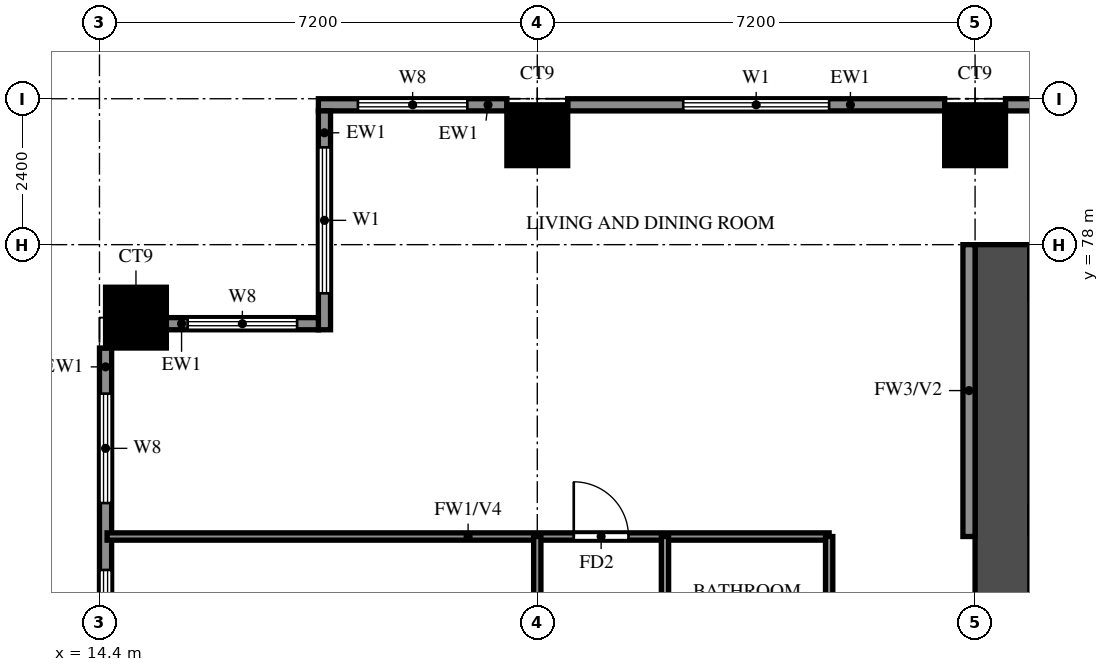
"""IFC4 building model, lengths in metres.
Left out: names, types, materials, properties, quantities, classifications, styles, units other than length and angle.
Written with IfcOpenShell. Run it as: python <this file> out.ifc"""

import sys

from ifc_helpers import new_model, si_unit, direction, frame, frame_2d, origin, origin_2d, place, context, subcontext, project, spatial, rectangle, extrude, source, transform, mapped, element, fill, save


model = new_model("IFC4")
c1 = context("Model", 3, precision=1e-05, world=origin(), true_north=direction((0.0, 1.0)))
c2 = subcontext(c1, "Body", "Model", "MODEL_VIEW")
j1 = project(units=[si_unit("LENGTHUNIT", "METRE"), si_unit("PLANEANGLEUNIT", "RADIAN")], contexts=[c1])
p1 = place(None, origin())
s1 = spatial("IfcSite", under=j1, at=p1, CompositionType="ELEMENT")
p2 = place(p1, origin())
s2 = spatial("IfcBuilding", under=s1, at=p2, CompositionType="ELEMENT")
p3 = place(p2, frame((0.0, 0.0, 72.5)))
s3 = spatial("IfcBuildingStorey", under=s2, at=p3, CompositionType="ELEMENT", Elevation=72.5)
m1 = source(origin(), c2, "Body", "SweptSolid", [
    extrude(rectangle(XDim=1.0, YDim=1.0, at=origin_2d()), origin(), (0.0, 0.0, 1.0), 3.18),
])
for number, where, z_axis, x_axis in (
    (1, (15.0, 76.8, 0.0), (0.0, 0.0, 1.0), (1.0, 0.0, 0.0)),
    (2, (21.6, 79.8, 0.0), (0.0, 0.0, 1.0), (1.0, 0.0, 0.0)),
    (3, (28.8, 79.8, 0.0), (0.0, 0.0, 1.0), (1.0, 0.0, 0.0)),
):
    element("IfcColumn", number, at=place(p3, frame(where, z_axis=z_axis, x_axis=x_axis)), inside=s3, PredefinedType="COLUMN", context=c2, shape_type="MappedRepresentation", body=[
        mapped(m1, transform((0.0, 0.0, 0.0))),
    ])
p4 = place(p3, frame((29.25, 66.0, 0.0), z_axis=(0.0, 0.0, 1.0), x_axis=(0.0, 1.0, 0.0)))
e4 = element("IfcWall", 4, at=p4, inside=s3, PredefinedType="SHEAR", context=c2, shape_type="SweptSolid", body=[
    extrude(rectangle(XDim=12.0, YDim=0.9, at=frame_2d((6.0, 0.0))), origin(), (0.0, 0.0, 1.0), 3.18),
])
p5 = place(p3, frame((29.7, 73.475, 0.0), z_axis=(0.0, 0.0, 1.0), x_axis=(1.0, 0.0, 0.0)))
e5 = element("IfcWall", 5, at=p5, inside=s3, PredefinedType="SHEAR", context=c2, shape_type="SweptSolid", body=[
    extrude(rectangle(XDim=3.175, YDim=0.45, at=frame_2d((1.587, 0.0))), origin(), (0.0, 0.0, 1.0), 3.18),
])
p6 = place(p3, frame((35.5, 80.3, 0.0), z_axis=(0.0, 0.0, 1.0), x_axis=(-1.0, 0.0, 0.0)))
e6 = element("IfcWall", 6, at=p6, inside=s3, PredefinedType="SOLIDWALL", context=c2, shape_type="SweptSolid", body=[
    extrude(rectangle(XDim=6.2, YDim=0.2, at=frame_2d((3.1, 0.0))), origin(), (0.0, 0.0, 1.0), 3.18),
])
p7 = place(p3, frame((28.3, 80.3, 0.0), z_axis=(0.0, 0.0, 1.0), x_axis=(-1.0, 0.0, 0.0)))
e7 = element("IfcWall", 7, at=p7, inside=s3, PredefinedType="SOLIDWALL", context=c2, shape_type="SweptSolid", body=[
    extrude(rectangle(XDim=6.2, YDim=0.2, at=frame_2d((3.1, 0.0))), origin(), (0.0, 0.0, 1.0), 3.18),
])
p8 = place(p7, frame((1.9, 0.0, 0.6)))
e8 = element("IfcOpeningElement", 8, at=p8, cuts=e7, PredefinedType="OPENING", context=c2, shape_type="SweptSolid", body=[
    extrude(rectangle(XDim=2.4, YDim=2.4, at=frame_2d((1.2, 1.2))), frame((0.0, 0.11, 0.0), z_axis=(0.0, -1.0, 0.0), x_axis=(1.0, 0.0, 0.0)), (0.0, 0.0, 1.0), 0.22),
])
p9 = place(p3, frame((21.1, 80.3, 0.0), z_axis=(0.0, 0.0, 1.0), x_axis=(-1.0, 0.0, 0.0)))
e9 = element("IfcWall", 9, at=p9, inside=s3, PredefinedType="SOLIDWALL", context=c2, shape_type="SweptSolid", body=[
    extrude(rectangle(XDim=3.1, YDim=0.2, at=frame_2d((1.55, 0.0))), origin(), (0.0, 0.0, 1.0), 3.18),
])
p10 = place(p9, frame((0.65, 0.0, 0.6)))
e10 = element("IfcOpeningElement", 10, at=p10, cuts=e9, PredefinedType="OPENING", context=c2, shape_type="SweptSolid", body=[
    extrude(rectangle(XDim=1.8, YDim=2.4, at=frame_2d((0.9, 1.2))), frame((0.0, 0.11, 0.0), z_axis=(0.0, -1.0, 0.0), x_axis=(1.0, 0.0, 0.0)), (0.0, 0.0, 1.0), 0.22),
])
p11 = place(p3, frame((18.1, 80.2, 0.0), z_axis=(0.0, 0.0, 1.0), x_axis=(0.0, -1.0, 0.0)))
e11 = element("IfcWall", 11, at=p11, inside=s3, PredefinedType="SOLIDWALL", context=c2, shape_type="SweptSolid", body=[
    extrude(rectangle(XDim=3.6, YDim=0.2, at=frame_2d((1.8, 0.0))), origin(), (0.0, 0.0, 1.0), 3.18),
])
p12 = place(p11, frame((0.6, 0.0, 0.6)))
e12 = element("IfcOpeningElement", 12, at=p12, cuts=e11, PredefinedType="OPENING", context=c2, shape_type="SweptSolid", body=[
    extrude(rectangle(XDim=2.4, YDim=2.4, at=frame_2d((1.2, 1.2))), frame((0.0, 0.11, 0.0), z_axis=(0.0, -1.0, 0.0), x_axis=(1.0, 0.0, 0.0)), (0.0, 0.0, 1.0), 0.22),
])
p13 = place(p3, frame((18.0, 76.7, 0.0), z_axis=(0.0, 0.0, 1.0), x_axis=(-1.0, 0.0, 0.0)))
e13 = element("IfcWall", 13, at=p13, inside=s3, PredefinedType="SOLIDWALL", context=c2, shape_type="SweptSolid", body=[
    extrude(rectangle(XDim=2.5, YDim=0.2, at=frame_2d((1.25, 0.0))), origin(), (0.0, 0.0, 1.0), 3.18),
])
p14 = place(p13, frame((0.35, 0.0, 0.6)))
e14 = element("IfcOpeningElement", 14, at=p14, cuts=e13, PredefinedType="OPENING", context=c2, shape_type="SweptSolid", body=[
    extrude(rectangle(XDim=1.8, YDim=2.4, at=frame_2d((0.9, 1.2))), frame((0.0, 0.11, 0.0), z_axis=(0.0, -1.0, 0.0), x_axis=(1.0, 0.0, 0.0)), (0.0, 0.0, 1.0), 0.22),
])
p15 = place(p3, frame((14.5, 76.3, 0.0), z_axis=(0.0, 0.0, 1.0), x_axis=(0.0, -1.0, 0.0)))
e15 = element("IfcWall", 15, at=p15, inside=s3, PredefinedType="SOLIDWALL", context=c2, shape_type="SweptSolid", body=[
    extrude(rectangle(XDim=6.2, YDim=0.2, at=frame_2d((3.1, 0.0))), origin(), (0.0, 0.0, 1.0), 3.18),
])
p16 = place(p15, frame((3.65, 0.0, 0.6)))
e16 = element("IfcOpeningElement", 16, at=p16, cuts=e15, PredefinedType="OPENING", context=c2, shape_type="SweptSolid", body=[
    extrude(rectangle(XDim=1.8, YDim=2.4, at=frame_2d((0.9, 1.2))), frame((0.0, 0.11, 0.0), z_axis=(0.0, -1.0, 0.0), x_axis=(1.0, 0.0, 0.0)), (0.0, 0.0, 1.0), 0.22),
])
p17 = place(p15, frame((0.75, 0.0, 0.6)))
e17 = element("IfcOpeningElement", 17, at=p17, cuts=e15, PredefinedType="OPENING", context=c2, shape_type="SweptSolid", body=[
    extrude(rectangle(XDim=1.8, YDim=2.4, at=frame_2d((0.9, 1.2))), frame((0.0, 0.11, 0.0), z_axis=(0.0, -1.0, 0.0), x_axis=(1.0, 0.0, 0.0)), (0.0, 0.0, 1.0), 0.22),
])
p18 = place(p3, frame((28.7, 73.2, 0.0), z_axis=(0.0, 0.0, 1.0), x_axis=(0.0, 1.0, 0.0)))
e18 = element("IfcWall", 18, at=p18, inside=s3, PredefinedType="SOLIDWALL", context=c2, shape_type="SweptSolid", body=[
    extrude(rectangle(XDim=4.8, YDim=0.2, at=frame_2d((2.4, 0.0))), origin(), (0.0, 0.0, 1.0), 3.18),
])
p19 = place(p3, frame((14.525, 73.2, 0.0), z_axis=(0.0, 0.0, 1.0), x_axis=(1.0, 0.0, 0.0)))
e19 = element("IfcWall", 19, at=p19, inside=s3, PredefinedType="PARTITIONING", context=c2, shape_type="SweptSolid", body=[
    extrude(rectangle(XDim=11.875, YDim=0.12, at=frame_2d((5.938, 0.0))), origin(), (0.0, 0.0, 1.0), 2.28),
])
p20 = place(p19, frame((7.675, 0.0, 0.0)))
e20 = element("IfcOpeningElement", 20, at=p20, cuts=e19, PredefinedType="OPENING", context=c2, shape_type="SweptSolid", body=[
    extrude(rectangle(XDim=0.9, YDim=2.1, at=frame_2d((0.45, 1.05))), frame((0.0, 0.07, 0.0), z_axis=(0.0, -1.0, 0.0), x_axis=(1.0, 0.0, 0.0)), (0.0, 0.0, 1.0), 0.14),
])
p21 = place(p3, frame((21.6, 33.725, 0.0), z_axis=(0.0, 0.0, 1.0), x_axis=(0.0, 1.0, 0.0)))
e21 = element("IfcWall", 21, at=p21, inside=s3, PredefinedType="PARTITIONING", context=c2, shape_type="SweptSolid", body=[
    extrude(rectangle(XDim=39.475, YDim=0.12, at=frame_2d((19.737, 0.0))), origin(), (0.0, 0.0, 1.0), 3.18),
])
p22 = place(p21, frame((7.775, 0.0, 0.0)))
e22 = element("IfcOpeningElement", 22, at=p22, cuts=e21, PredefinedType="OPENING", context=c2, shape_type="SweptSolid", body=[
    extrude(rectangle(XDim=0.9, YDim=2.1, at=frame_2d((0.45, 1.05))), frame((0.0, 0.07, 0.0), z_axis=(0.0, -1.0, 0.0), x_axis=(1.0, 0.0, 0.0)), (0.0, 0.0, 1.0), 0.14),
])
p23 = place(p21, frame((17.125, 0.0, 0.0)))
e23 = element("IfcOpeningElement", 23, at=p23, cuts=e21, PredefinedType="OPENING", context=c2, shape_type="SweptSolid", body=[
    extrude(rectangle(XDim=1.5, YDim=2.1, at=frame_2d((0.75, 1.05))), frame((0.0, 0.07, 0.0), z_axis=(0.0, -1.0, 0.0), x_axis=(1.0, 0.0, 0.0)), (0.0, 0.0, 1.0), 0.14),
])
p24 = place(p21, frame((22.825, 0.0, 0.0)))
e24 = element("IfcOpeningElement", 24, at=p24, cuts=e21, PredefinedType="OPENING", context=c2, shape_type="SweptSolid", body=[
    extrude(rectangle(XDim=0.9, YDim=2.1, at=frame_2d((0.45, 1.05))), frame((0.0, 0.07, 0.0), z_axis=(0.0, -1.0, 0.0), x_axis=(1.0, 0.0, 0.0)), (0.0, 0.0, 1.0), 0.14),
])
p25 = place(p21, frame((26.425, 0.0, 0.0)))
e25 = element("IfcOpeningElement", 25, at=p25, cuts=e21, PredefinedType="OPENING", context=c2, shape_type="SweptSolid", body=[
    extrude(rectangle(XDim=0.9, YDim=2.1, at=frame_2d((0.45, 1.05))), frame((0.0, 0.07, 0.0), z_axis=(0.0, -1.0, 0.0), x_axis=(1.0, 0.0, 0.0)), (0.0, 0.0, 1.0), 0.14),
])
p26 = place(p21, frame((30.025, 0.0, 0.0)))
e26 = element("IfcOpeningElement", 26, at=p26, cuts=e21, PredefinedType="OPENING", context=c2, shape_type="SweptSolid", body=[
    extrude(rectangle(XDim=0.9, YDim=2.1, at=frame_2d((0.45, 1.05))), frame((0.0, 0.07, 0.0), z_axis=(0.0, -1.0, 0.0), x_axis=(1.0, 0.0, 0.0)), (0.0, 0.0, 1.0), 0.14),
])
p27 = place(p21, frame((33.625, 0.0, 0.0)))
e27 = element("IfcOpeningElement", 27, at=p27, cuts=e21, PredefinedType="OPENING", context=c2, shape_type="SweptSolid", body=[
    extrude(rectangle(XDim=0.9, YDim=2.1, at=frame_2d((0.45, 1.05))), frame((0.0, 0.07, 0.0), z_axis=(0.0, -1.0, 0.0), x_axis=(1.0, 0.0, 0.0)), (0.0, 0.0, 1.0), 0.14),
])
p28 = place(p21, frame((37.225, 0.0, 0.0)))
e28 = element("IfcOpeningElement", 28, at=p28, cuts=e21, PredefinedType="OPENING", context=c2, shape_type="SweptSolid", body=[
    extrude(rectangle(XDim=0.9, YDim=2.1, at=frame_2d((0.45, 1.05))), frame((0.0, 0.07, 0.0), z_axis=(0.0, -1.0, 0.0), x_axis=(1.0, 0.0, 0.0)), (0.0, 0.0, 1.0), 0.14),
])
p29 = place(p3, frame((23.7, 64.8, 0.0), z_axis=(0.0, 0.0, 1.0), x_axis=(0.0, 1.0, 0.0)))
e29 = element("IfcWall", 29, at=p29, inside=s3, PredefinedType="PARTITIONING", context=c2, shape_type="SweptSolid", body=[
    extrude(rectangle(XDim=8.4, YDim=0.12, at=frame_2d((4.2, 0.0))), origin(), (0.0, 0.0, 1.0), 3.18),
])
p30 = place(p29, frame((1.875, 0.0, 0.0)))
e30 = element("IfcOpeningElement", 30, at=p30, cuts=e29, PredefinedType="OPENING", context=c2, shape_type="SweptSolid", body=[
    extrude(rectangle(XDim=0.9, YDim=2.1, at=frame_2d((0.45, 1.05))), frame((0.0, 0.07, 0.0), z_axis=(0.0, -1.0, 0.0), x_axis=(1.0, 0.0, 0.0)), (0.0, 0.0, 1.0), 0.14),
])
p31 = place(p29, frame((6.125, 0.0, 0.0)))
e31 = element("IfcOpeningElement", 31, at=p31, cuts=e29, PredefinedType="OPENING", context=c2, shape_type="SweptSolid", body=[
    extrude(rectangle(XDim=0.8, YDim=2.1, at=frame_2d((0.4, 1.05))), frame((0.0, 0.07, 0.0), z_axis=(0.0, -1.0, 0.0), x_axis=(1.0, 0.0, 0.0)), (0.0, 0.0, 1.0), 0.14),
])
p32 = place(p3, frame((26.4, 69.62, 0.0), z_axis=(0.0, 0.0, 1.0), x_axis=(0.0, 1.0, 0.0)))
e32 = element("IfcWall", 32, at=p32, inside=s3, PredefinedType="PARTITIONING", context=c2, shape_type="SweptSolid", body=[
    extrude(rectangle(XDim=3.58, YDim=0.12, at=frame_2d((1.79, 0.0))), origin(), (0.0, 0.0, 1.0), 3.18),
])
p33 = place(p8, origin())
e33 = element("IfcWindow", 33, at=p33, inside=s3, PartitioningType="DOUBLE_PANEL_VERTICAL", PredefinedType="WINDOW", context=c2, shape_type="SweptSolid", body=[
    extrude(rectangle(XDim=2.4, YDim=2.4, at=frame_2d((1.2, 1.2))), frame((0.0, 0.03, 0.0), z_axis=(0.0, -1.0, 0.0), x_axis=(1.0, 0.0, 0.0)), (0.0, 0.0, 1.0), 0.06),
])
fill(e8, e33)
p34 = place(p10, origin())
e34 = element("IfcWindow", 34, at=p34, inside=s3, PartitioningType="DOUBLE_PANEL_VERTICAL", PredefinedType="WINDOW", context=c2, shape_type="SweptSolid", body=[
    extrude(rectangle(XDim=1.8, YDim=2.4, at=frame_2d((0.9, 1.2))), frame((0.0, 0.03, 0.0), z_axis=(0.0, -1.0, 0.0), x_axis=(1.0, 0.0, 0.0)), (0.0, 0.0, 1.0), 0.06),
])
fill(e10, e34)
p35 = place(p12, origin())
e35 = element("IfcWindow", 35, at=p35, inside=s3, PartitioningType="DOUBLE_PANEL_VERTICAL", PredefinedType="WINDOW", context=c2, shape_type="SweptSolid", body=[
    extrude(rectangle(XDim=2.4, YDim=2.4, at=frame_2d((1.2, 1.2))), frame((0.0, 0.03, 0.0), z_axis=(0.0, -1.0, 0.0), x_axis=(1.0, 0.0, 0.0)), (0.0, 0.0, 1.0), 0.06),
])
fill(e12, e35)
p36 = place(p14, origin())
e36 = element("IfcWindow", 36, at=p36, inside=s3, PartitioningType="DOUBLE_PANEL_VERTICAL", PredefinedType="WINDOW", context=c2, shape_type="SweptSolid", body=[
    extrude(rectangle(XDim=1.8, YDim=2.4, at=frame_2d((0.9, 1.2))), frame((0.0, 0.03, 0.0), z_axis=(0.0, -1.0, 0.0), x_axis=(1.0, 0.0, 0.0)), (0.0, 0.0, 1.0), 0.06),
])
fill(e14, e36)
p37 = place(p16, origin())
e37 = element("IfcWindow", 37, at=p37, inside=s3, PartitioningType="DOUBLE_PANEL_VERTICAL", PredefinedType="WINDOW", context=c2, shape_type="SweptSolid", body=[
    extrude(rectangle(XDim=1.8, YDim=2.4, at=frame_2d((0.9, 1.2))), frame((0.0, 0.03, 0.0), z_axis=(0.0, -1.0, 0.0), x_axis=(1.0, 0.0, 0.0)), (0.0, 0.0, 1.0), 0.06),
])
fill(e16, e37)
p38 = place(p17, origin())
e38 = element("IfcWindow", 38, at=p38, inside=s3, PartitioningType="DOUBLE_PANEL_VERTICAL", PredefinedType="WINDOW", context=c2, shape_type="SweptSolid", body=[
    extrude(rectangle(XDim=1.8, YDim=2.4, at=frame_2d((0.9, 1.2))), frame((0.0, 0.03, 0.0), z_axis=(0.0, -1.0, 0.0), x_axis=(1.0, 0.0, 0.0)), (0.0, 0.0, 1.0), 0.06),
])
fill(e17, e38)
p39 = place(p20, origin())
e39 = element("IfcDoor", 39, at=p39, inside=s3, OperationType="SINGLE_SWING_LEFT", PredefinedType="DOOR", context=c2, shape_type="SweptSolid", body=[
    extrude(rectangle(XDim=0.9, YDim=2.1, at=frame_2d((0.45, 1.05))), frame((0.0, 0.025, 0.0), z_axis=(0.0, -1.0, 0.0), x_axis=(1.0, 0.0, 0.0)), (0.0, 0.0, 1.0), 0.05),
])
fill(e20, e39)
save(model, sys.argv[1])
